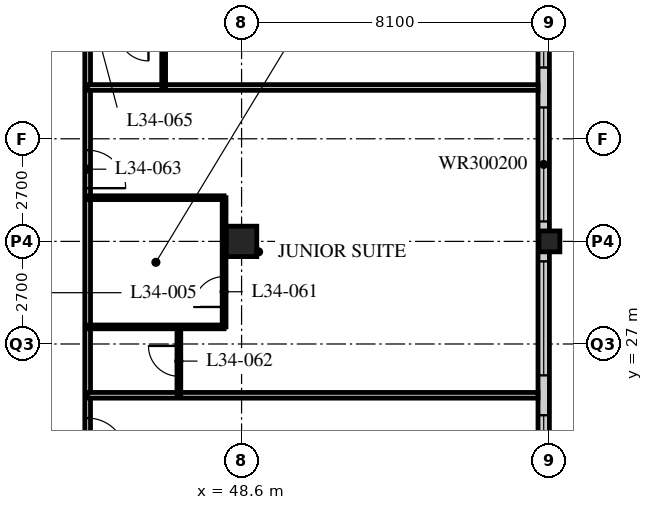
"""IFC4 building model, lengths in metres.
Left out: names, types, materials, properties, quantities, classifications, styles, units other than length and angle.
Written with IfcOpenShell. Run it as: python <this file> out.ifc"""

import sys

from ifc_helpers import new_model, si_unit, direction, frame, frame_2d, origin, origin_2d, place, context, subcontext, project, spatial, rectangle, hollow_rectangle, extrude, element, fill, save


model = new_model("IFC4")
c1 = context("Model", 3, precision=1e-05, world=origin(), true_north=direction((0.0, 1.0)))
c2 = subcontext(c1, "Body", "Model", "MODEL_VIEW")
j1 = project(units=[si_unit("LENGTHUNIT", "METRE"), si_unit("PLANEANGLEUNIT", "RADIAN")], contexts=[c1])
p1 = place(None, origin())
s1 = spatial("IfcSite", under=j1, at=p1, CompositionType="ELEMENT")
p2 = place(p1, origin())
s2 = spatial("IfcBuilding", under=s1, at=p2, CompositionType="ELEMENT")
p3 = place(p2, frame((0.0, 0.0, 134.0)))
s3 = spatial("IfcBuildingStorey", under=s2, at=p3, CompositionType="ELEMENT", Elevation=134.0)
p4 = place(p3, frame((48.6, 29.7, 0.0), z_axis=(0.0, 0.0, 1.0), x_axis=(1.0, 0.0, 0.0)))
e1 = element("IfcColumn", 1, at=p4, inside=s3, PredefinedType="COLUMN", context=c2, shape_type="SweptSolid", body=[
    extrude(hollow_rectangle(XDim=0.8, YDim=0.8, WallThickness=0.08, at=origin_2d()), origin(), (0.0, 0.0, 1.0), 3.4),
])
p5 = place(p3, frame((56.7, 29.7, 0.0), z_axis=(0.0, 0.0, 1.0), x_axis=(1.0, 0.0, 0.0)))
e2 = element("IfcColumn", 2, at=p5, inside=s3, PredefinedType="COLUMN", context=c2, shape_type="SweptSolid", body=[
    extrude(hollow_rectangle(XDim=0.55, YDim=0.55, WallThickness=0.04, at=origin_2d()), origin(), (0.0, 0.0, 1.0), 3.4),
])
p6 = place(p3, frame((56.55, 13.8, 0.0), z_axis=(0.0, 0.0, 1.0), x_axis=(0.0, 1.0, 0.0)))
e3 = element("IfcWall", 3, at=p6, inside=s3, PredefinedType="SOLIDWALL", context=c2, shape_type="SweptSolid", body=[
    extrude(rectangle(XDim=32.1, YDim=0.3, at=frame_2d((16.05, 0.0))), origin(), (0.0, 0.0, 1.0), 3.19),
])
p7 = place(p6, frame((0.225, 0.0, 0.9)))
e4 = element("IfcOpeningElement", 4, at=p7, cuts=e3, PredefinedType="OPENING", context=c2, shape_type="SweptSolid", body=[
    extrude(rectangle(XDim=3.0, YDim=2.0, at=frame_2d((1.5, 1.0))), frame((0.0, 0.16, 0.0), z_axis=(0.0, -1.0, 0.0), x_axis=(1.0, 0.0, 0.0)), (0.0, 0.0, 1.0), 0.32),
])
p8 = place(p6, frame((4.275, 0.0, 0.9)))
e5 = element("IfcOpeningElement", 5, at=p8, cuts=e3, PredefinedType="OPENING", context=c2, shape_type="SweptSolid", body=[
    extrude(rectangle(XDim=3.0, YDim=2.0, at=frame_2d((1.5, 1.0))), frame((0.0, 0.16, 0.0), z_axis=(0.0, -1.0, 0.0), x_axis=(1.0, 0.0, 0.0)), (0.0, 0.0, 1.0), 0.32),
])
p9 = place(p6, frame((8.325, 0.0, 0.9)))
e6 = element("IfcOpeningElement", 6, at=p9, cuts=e3, PredefinedType="OPENING", context=c2, shape_type="SweptSolid", body=[
    extrude(rectangle(XDim=3.0, YDim=2.0, at=frame_2d((1.5, 1.0))), frame((0.0, 0.16, 0.0), z_axis=(0.0, -1.0, 0.0), x_axis=(1.0, 0.0, 0.0)), (0.0, 0.0, 1.0), 0.32),
])
p10 = place(p6, frame((12.375, 0.0, 0.9)))
e7 = element("IfcOpeningElement", 7, at=p10, cuts=e3, PredefinedType="OPENING", context=c2, shape_type="SweptSolid", body=[
    extrude(rectangle(XDim=3.0, YDim=2.0, at=frame_2d((1.5, 1.0))), frame((0.0, 0.16, 0.0), z_axis=(0.0, -1.0, 0.0), x_axis=(1.0, 0.0, 0.0)), (0.0, 0.0, 1.0), 0.32),
])
p11 = place(p6, frame((16.425, 0.0, 0.9)))
e8 = element("IfcOpeningElement", 8, at=p11, cuts=e3, PredefinedType="OPENING", context=c2, shape_type="SweptSolid", body=[
    extrude(rectangle(XDim=3.0, YDim=2.0, at=frame_2d((1.5, 1.0))), frame((0.0, 0.16, 0.0), z_axis=(0.0, -1.0, 0.0), x_axis=(1.0, 0.0, 0.0)), (0.0, 0.0, 1.0), 0.32),
])
p12 = place(p6, frame((20.475, 0.0, 0.9)))
e9 = element("IfcOpeningElement", 9, at=p12, cuts=e3, PredefinedType="OPENING", context=c2, shape_type="SweptSolid", body=[
    extrude(rectangle(XDim=3.0, YDim=2.0, at=frame_2d((1.5, 1.0))), frame((0.0, 0.16, 0.0), z_axis=(0.0, -1.0, 0.0), x_axis=(1.0, 0.0, 0.0)), (0.0, 0.0, 1.0), 0.32),
])
p13 = place(p6, frame((24.525, 0.0, 0.9)))
e10 = element("IfcOpeningElement", 10, at=p13, cuts=e3, PredefinedType="OPENING", context=c2, shape_type="SweptSolid", body=[
    extrude(rectangle(XDim=3.0, YDim=2.0, at=frame_2d((1.5, 1.0))), frame((0.0, 0.16, 0.0), z_axis=(0.0, -1.0, 0.0), x_axis=(1.0, 0.0, 0.0)), (0.0, 0.0, 1.0), 0.32),
])
p14 = place(p6, frame((28.575, 0.0, 0.9)))
e11 = element("IfcOpeningElement", 11, at=p14, cuts=e3, PredefinedType="OPENING", context=c2, shape_type="SweptSolid", body=[
    extrude(rectangle(XDim=3.0, YDim=2.0, at=frame_2d((1.5, 1.0))), frame((0.0, 0.16, 0.0), z_axis=(0.0, -1.0, 0.0), x_axis=(1.0, 0.0, 0.0)), (0.0, 0.0, 1.0), 0.32),
])
p15 = place(p3, frame((44.55, 17.55, 0.0), z_axis=(0.0, 0.0, 1.0), x_axis=(0.0, 1.0, 0.0)))
e12 = element("IfcWall", 12, at=p15, inside=s3, PredefinedType="PARTITIONING", context=c2, shape_type="SweptSolid", body=[
    extrude(rectangle(XDim=28.35, YDim=0.15, at=frame_2d((14.175, 0.0))), origin(), (0.0, 0.0, 1.0), 3.19),
])
p16 = place(p15, frame((2.75, 0.0, 0.0)))
e13 = element("IfcOpeningElement", 13, at=p16, cuts=e12, PredefinedType="OPENING", context=c2, shape_type="SweptSolid", body=[
    extrude(rectangle(XDim=1.0, YDim=2.1, at=frame_2d((0.5, 1.05))), frame((0.0, 0.085, 0.0), z_axis=(0.0, -1.0, 0.0), x_axis=(1.0, 0.0, 0.0)), (0.0, 0.0, 1.0), 0.17),
])
p17 = place(p15, frame((6.5, 0.0, 0.0)))
e14 = element("IfcOpeningElement", 14, at=p17, cuts=e12, PredefinedType="OPENING", context=c2, shape_type="SweptSolid", body=[
    extrude(rectangle(XDim=1.0, YDim=2.1, at=frame_2d((0.5, 1.05))), frame((0.0, 0.085, 0.0), z_axis=(0.0, -1.0, 0.0), x_axis=(1.0, 0.0, 0.0)), (0.0, 0.0, 1.0), 0.17),
])
p18 = place(p15, frame((13.55, 0.0, 0.0)))
e15 = element("IfcOpeningElement", 15, at=p18, cuts=e12, PredefinedType="OPENING", context=c2, shape_type="SweptSolid", body=[
    extrude(rectangle(XDim=1.0, YDim=2.1, at=frame_2d((0.5, 1.05))), frame((0.0, 0.085, 0.0), z_axis=(0.0, -1.0, 0.0), x_axis=(1.0, 0.0, 0.0)), (0.0, 0.0, 1.0), 0.17),
])
p19 = place(p15, frame((18.1, 0.0, 0.0)))
e16 = element("IfcOpeningElement", 16, at=p19, cuts=e12, PredefinedType="OPENING", context=c2, shape_type="SweptSolid", body=[
    extrude(rectangle(XDim=1.0, YDim=2.1, at=frame_2d((0.5, 1.05))), frame((0.0, 0.085, 0.0), z_axis=(0.0, -1.0, 0.0), x_axis=(1.0, 0.0, 0.0)), (0.0, 0.0, 1.0), 0.17),
])
p20 = place(p15, frame((26.75, 0.0, 0.0)))
e17 = element("IfcOpeningElement", 17, at=p20, cuts=e12, PredefinedType="OPENING", context=c2, shape_type="SweptSolid", body=[
    extrude(rectangle(XDim=1.0, YDim=2.1, at=frame_2d((0.5, 1.05))), frame((0.0, 0.085, 0.0), z_axis=(0.0, -1.0, 0.0), x_axis=(1.0, 0.0, 0.0)), (0.0, 0.0, 1.0), 0.17),
])
p21 = place(p3, frame((44.55, 25.65, 0.0), z_axis=(0.0, 0.0, 1.0), x_axis=(1.0, 0.0, 0.0)))
e18 = element("IfcWall", 18, at=p21, inside=s3, PredefinedType="PARTITIONING", context=c2, shape_type="SweptSolid", body=[
    extrude(rectangle(XDim=11.85, YDim=0.15, at=frame_2d((5.925, 0.0))), origin(), (0.0, 0.0, 1.0), 3.19),
])
p22 = place(p3, frame((48.14, 27.45, 0.0), z_axis=(0.0, 0.0, 1.0), x_axis=(0.0, 1.0, 0.0)))
e19 = element("IfcWall", 19, at=p22, inside=s3, PredefinedType="PARTITIONING", context=c2, shape_type="SweptSolid", body=[
    extrude(rectangle(XDim=3.4, YDim=0.1, at=frame_2d((1.7, 0.0))), origin(), (0.0, 0.0, 1.0), 3.19),
])
p23 = place(p22, frame((0.525, 0.0, 0.0)))
e20 = element("IfcOpeningElement", 20, at=p23, cuts=e19, PredefinedType="OPENING", context=c2, shape_type="SweptSolid", body=[
    extrude(rectangle(XDim=0.8, YDim=2.1, at=frame_2d((0.4, 1.05))), frame((0.0, 0.06, 0.0), z_axis=(0.0, -1.0, 0.0), x_axis=(1.0, 0.0, 0.0)), (0.0, 0.0, 1.0), 0.12),
])
p24 = place(p3, frame((46.95, 25.65, 0.0), z_axis=(0.0, 0.0, 1.0), x_axis=(0.0, 1.0, 0.0)))
e21 = element("IfcWall", 21, at=p24, inside=s3, PredefinedType="PARTITIONING", context=c2, shape_type="SweptSolid", body=[
    extrude(rectangle(XDim=1.8, YDim=0.1, at=frame_2d((0.9, 0.0))), origin(), (0.0, 0.0, 1.0), 3.19),
])
p25 = place(p24, frame((0.5, 0.0, 0.0)))
e22 = element("IfcOpeningElement", 22, at=p25, cuts=e21, PredefinedType="OPENING", context=c2, shape_type="SweptSolid", body=[
    extrude(rectangle(XDim=0.8, YDim=2.1, at=frame_2d((0.4, 1.05))), frame((0.0, 0.06, 0.0), z_axis=(0.0, -1.0, 0.0), x_axis=(1.0, 0.0, 0.0)), (0.0, 0.0, 1.0), 0.12),
])
for number, where, z_axis, x_axis in (
    (23, (44.55, 27.45, 0.0), (0.0, 0.0, 1.0), (1.0, 0.0, 0.0)),
    (24, (44.55, 30.85, 0.0), (0.0, 0.0, 1.0), (1.0, 0.0, 0.0)),
):
    element("IfcWall", number, at=place(p3, frame(where, z_axis=z_axis, x_axis=x_axis)), inside=s3, PredefinedType="PARTITIONING", context=c2, shape_type="SweptSolid", body=[
        extrude(rectangle(XDim=3.59, YDim=0.1, at=frame_2d((1.795, 0.0))), origin(), (0.0, 0.0, 1.0), 3.19),
    ])
p26 = place(p3, frame((44.55, 33.75, 0.0), z_axis=(0.0, 0.0, 1.0), x_axis=(1.0, 0.0, 0.0)))
e25 = element("IfcWall", 25, at=p26, inside=s3, PredefinedType="PARTITIONING", context=c2, shape_type="SweptSolid", body=[
    extrude(rectangle(XDim=11.85, YDim=0.15, at=frame_2d((5.925, 0.0))), origin(), (0.0, 0.0, 1.0), 3.19),
])
p27 = place(p3, frame((46.55, 33.75, 0.0), z_axis=(0.0, 0.0, 1.0), x_axis=(0.0, 1.0, 0.0)))
e26 = element("IfcWall", 26, at=p27, inside=s3, PredefinedType="PARTITIONING", context=c2, shape_type="SweptSolid", body=[
    extrude(rectangle(XDim=1.5, YDim=0.1, at=frame_2d((0.75, 0.0))), origin(), (0.0, 0.0, 1.0), 3.19),
])
p28 = place(p9, origin())
e27 = element("IfcWindow", 27, at=p28, inside=s3, PartitioningType="SINGLE_PANEL", PredefinedType="WINDOW", context=c2, shape_type="SweptSolid", body=[
    extrude(rectangle(XDim=3.0, YDim=2.0, at=frame_2d((1.5, 1.0))), frame((0.0, 0.03, 0.0), z_axis=(0.0, -1.0, 0.0), x_axis=(1.0, 0.0, 0.0)), (0.0, 0.0, 1.0), 0.06),
])
fill(e6, e27)
p29 = place(p10, origin())
e28 = element("IfcWindow", 28, at=p29, inside=s3, PartitioningType="SINGLE_PANEL", PredefinedType="WINDOW", context=c2, shape_type="SweptSolid", body=[
    extrude(rectangle(XDim=3.0, YDim=2.0, at=frame_2d((1.5, 1.0))), frame((0.0, 0.03, 0.0), z_axis=(0.0, -1.0, 0.0), x_axis=(1.0, 0.0, 0.0)), (0.0, 0.0, 1.0), 0.06),
])
fill(e7, e28)
p30 = place(p11, origin())
e29 = element("IfcWindow", 29, at=p30, inside=s3, PartitioningType="SINGLE_PANEL", PredefinedType="WINDOW", context=c2, shape_type="SweptSolid", body=[
    extrude(rectangle(XDim=3.0, YDim=2.0, at=frame_2d((1.5, 1.0))), frame((0.0, 0.03, 0.0), z_axis=(0.0, -1.0, 0.0), x_axis=(1.0, 0.0, 0.0)), (0.0, 0.0, 1.0), 0.06),
])
fill(e8, e29)
p31 = place(p12, origin())
e30 = element("IfcWindow", 30, at=p31, inside=s3, PartitioningType="SINGLE_PANEL", PredefinedType="WINDOW", context=c2, shape_type="SweptSolid", body=[
    extrude(rectangle(XDim=3.0, YDim=2.0, at=frame_2d((1.5, 1.0))), frame((0.0, 0.03, 0.0), z_axis=(0.0, -1.0, 0.0), x_axis=(1.0, 0.0, 0.0)), (0.0, 0.0, 1.0), 0.06),
])
fill(e9, e30)
p32 = place(p17, origin())
e31 = element("IfcDoor", 31, at=p32, inside=s3, OperationType="SINGLE_SWING_RIGHT", PredefinedType="DOOR", context=c2, shape_type="SweptSolid", body=[
    extrude(rectangle(XDim=1.0, YDim=2.1, at=frame_2d((0.5, 1.05))), frame((0.0, 0.025, 0.0), z_axis=(0.0, -1.0, 0.0), x_axis=(1.0, 0.0, 0.0)), (0.0, 0.0, 1.0), 0.05),
])
fill(e14, e31)
p33 = place(p23, origin())
e32 = element("IfcDoor", 32, at=p33, inside=s3, OperationType="SINGLE_SWING_LEFT", PredefinedType="DOOR", context=c2, shape_type="SweptSolid", body=[
    extrude(rectangle(XDim=0.8, YDim=2.1, at=frame_2d((0.4, 1.05))), frame((0.0, 0.025, 0.0), z_axis=(0.0, -1.0, 0.0), x_axis=(1.0, 0.0, 0.0)), (0.0, 0.0, 1.0), 0.05),
])
fill(e20, e32)
p34 = place(p25, origin())
e33 = element("IfcDoor", 33, at=p34, inside=s3, OperationType="SINGLE_SWING_RIGHT", PredefinedType="DOOR", context=c2, shape_type="SweptSolid", body=[
    extrude(rectangle(XDim=0.8, YDim=2.1, at=frame_2d((0.4, 1.05))), frame((0.0, 0.025, 0.0), z_axis=(0.0, -1.0, 0.0), x_axis=(1.0, 0.0, 0.0)), (0.0, 0.0, 1.0), 0.05),
])
fill(e22, e33)
p35 = place(p18, origin())
e34 = element("IfcDoor", 34, at=p35, inside=s3, OperationType="SINGLE_SWING_RIGHT", PredefinedType="DOOR", context=c2, shape_type="SweptSolid", body=[
    extrude(rectangle(XDim=1.0, YDim=2.1, at=frame_2d((0.5, 1.05))), frame((0.0, 0.025, 0.0), z_axis=(0.0, -1.0, 0.0), x_axis=(1.0, 0.0, 0.0)), (0.0, 0.0, 1.0), 0.05),
])
fill(e15, e34)
save(model, sys.argv[1])
